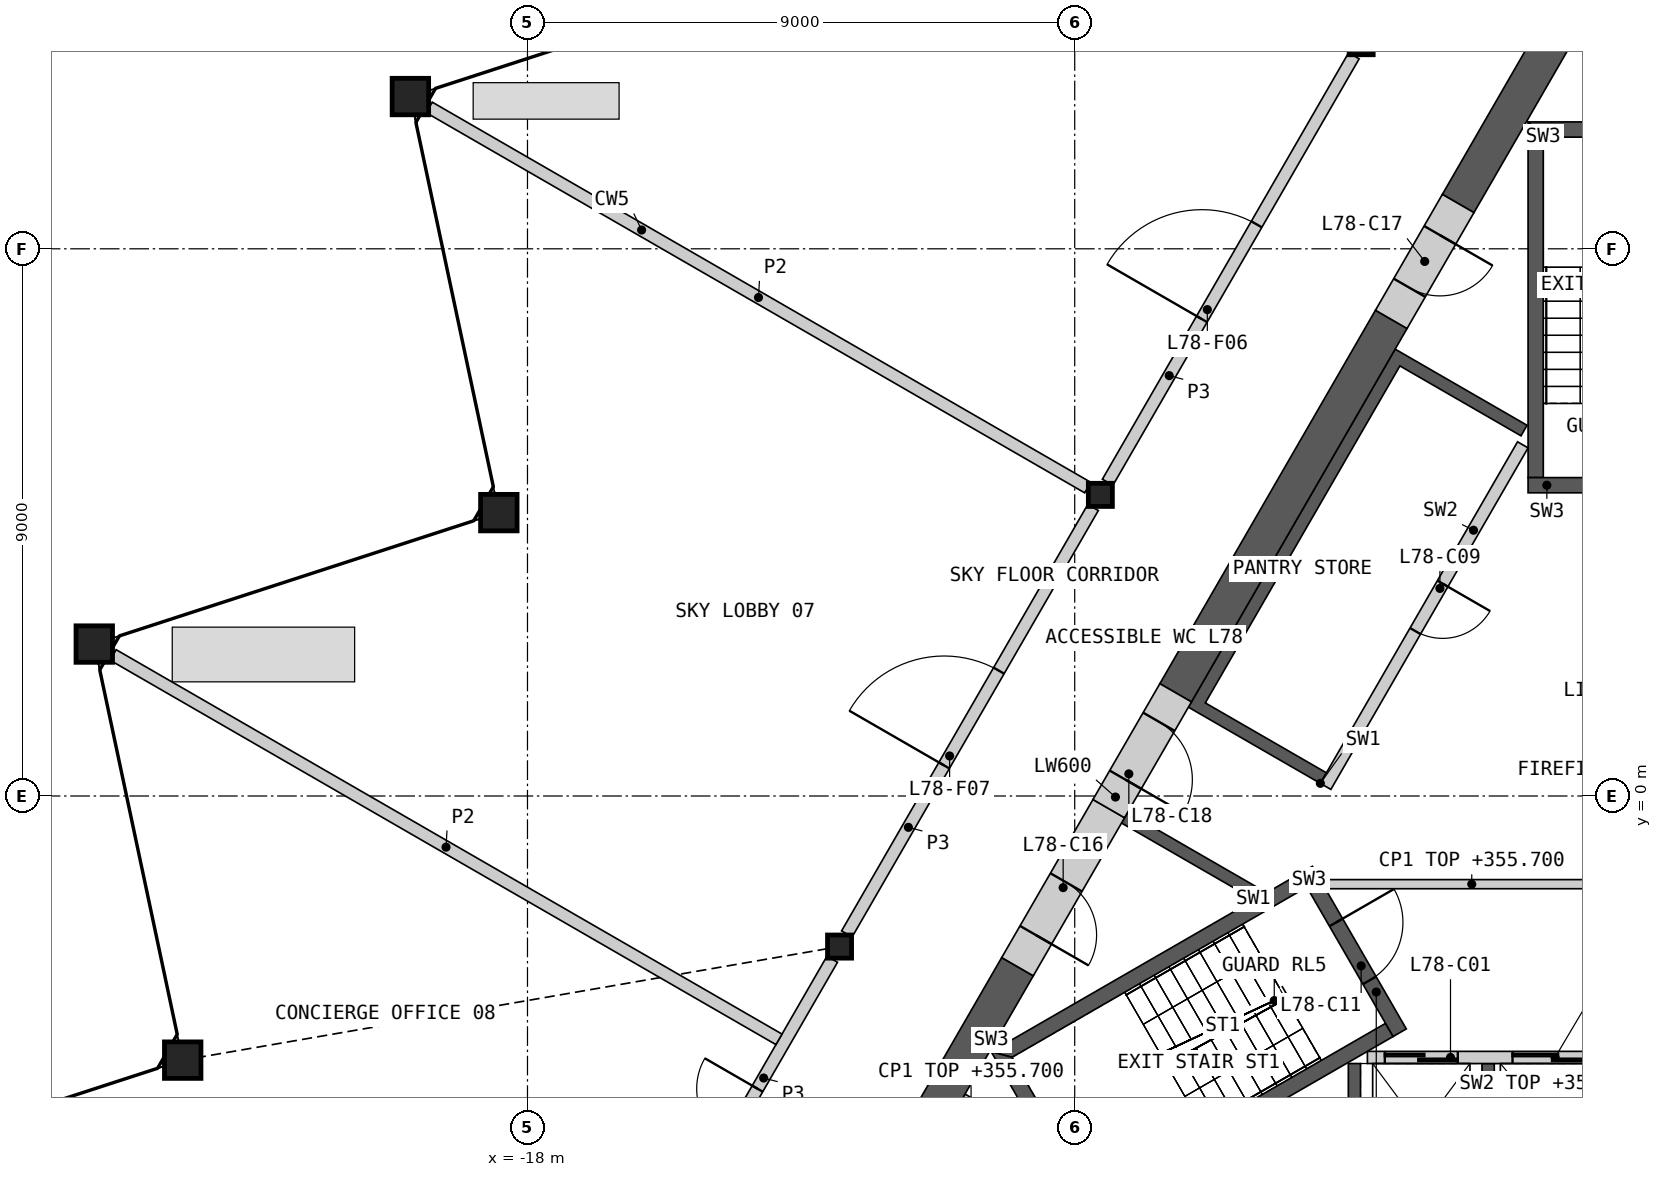
"""IFC4 building model, lengths in metres.
Left out: names, types, materials, properties, quantities, classifications, styles, units other than length and angle.
Written with IfcOpenShell. Run it as: python <this file> out.ifc"""

import sys

from ifc_helpers import new_model, si_unit, direction, frame, frame_2d, origin, origin_2d, place, context, subcontext, project, spatial, polyline, rectangle, hollow_rectangle, i_section, outline, extrude, element, fill, save


model = new_model("IFC4")
c1 = context("Model", 3, precision=1e-05, world=origin(), true_north=direction((0.0, 1.0)))
c2 = subcontext(c1, "Body", "Model", "MODEL_VIEW")
j1 = project(units=[si_unit("LENGTHUNIT", "METRE"), si_unit("PLANEANGLEUNIT", "RADIAN")], contexts=[c1])
p1 = place(None, origin())
s1 = spatial("IfcSite", under=j1, at=p1, CompositionType="ELEMENT")
p2 = place(p1, origin())
s2 = spatial("IfcBuilding", under=s1, at=p2, CompositionType="ELEMENT")
p3 = place(p2, frame((0.0, 0.0, 346.0)))
s3 = spatial("IfcBuildingStorey", under=s2, at=p3, CompositionType="ELEMENT", Elevation=346.0)
for number, where, z_axis, x_axis in (
    (1, (-19.926, 11.504, 0.0), (0.0, 0.0, 1.0), (1.0, 0.0, 0.0)),
    (2, (-18.471, 4.661, 0.0), (0.0, 0.0, 1.0), (1.0, 0.0, 0.0)),
    (3, (-25.125, 2.499, 0.0), (0.0, 0.0, 1.0), (1.0, 0.0, 0.0)),
    (4, (-23.67, -4.344, 0.0), (0.0, 0.0, 1.0), (1.0, 0.0, 0.0)),
):
    element("IfcColumn", number, at=place(p3, frame(where, z_axis=z_axis, x_axis=x_axis)), inside=s3, PredefinedType="COLUMN", context=c2, shape_type="SweptSolid", body=[
        extrude(hollow_rectangle(XDim=0.6, YDim=0.6, WallThickness=0.04, at=origin_2d()), origin(), (0.0, 0.0, 1.0), 10.0),
    ])
for number, where, z_axis, x_axis in (
    (5, (-4.289, 12.382, 0.0), (0.0, 0.0, 1.0), (1.0, 0.0, 0.0)),
    (6, (-8.578, 4.953, 0.0), (0.0, 0.0, 1.0), (1.0, 0.0, 0.0)),
    (7, (-12.868, -2.476, 0.0), (0.0, 0.0, 1.0), (1.0, 0.0, 0.0)),
):
    element("IfcColumn", number, at=place(p3, frame(where, z_axis=z_axis, x_axis=x_axis)), inside=s3, PredefinedType="COLUMN", context=c2, shape_type="SweptSolid", body=[
        extrude(i_section(OverallWidth=0.396, OverallDepth=0.381, WebThickness=0.019, FlangeThickness=0.03, at=origin_2d()), origin(), (0.0, 0.0, 1.0), 10.0),
    ])
p4 = place(p3, origin())
e8 = element("IfcWall", 8, at=p4, inside=s3, PredefinedType="SHEAR", context=c2, shape_type="SweptSolid", body=[
    extrude(outline(polyline([(4.5, -4.4), (4.5, -6.906), (-4.5, -6.906), (-4.5, -4.4), (-4.3, -4.4), (-4.3, -6.7), (-2.3, -6.7), (-2.3, -4.4), (-2.1, -4.4), (-2.1, -6.7), (-0.1, -6.7), (-0.1, -4.4), (0.1, -4.4), (0.1, -6.7), (2.1, -6.7), (2.1, -4.4), (2.3, -4.4), (2.3, -6.7), (4.3, -6.7), (4.3, -4.4), (4.5, -4.4)])), origin(), (0.0, 0.0, 1.0), 9.7),
])
p5 = place(p3, frame((-4.187, -4.3, 0.0), z_axis=(0.0, 0.0, 1.0), x_axis=(1.0, 0.0, 0.0)))
e9 = element("IfcWall", 9, at=p5, inside=s3, PredefinedType="SOLIDWALL", context=c2, shape_type="SweptSolid", body=[
    extrude(rectangle(XDim=8.373, YDim=0.2, at=frame_2d((4.187, 0.0))), origin(), (0.0, 0.0, 1.0), 9.7),
])
p6 = place(p5, frame((0.287, 0.0, 0.0)))
e10 = element("IfcOpeningElement", 10, at=p6, cuts=e9, PredefinedType="OPENING", context=c2, shape_type="SweptSolid", body=[
    extrude(rectangle(XDim=1.2, YDim=2.1, at=frame_2d((0.6, 1.05))), frame((0.0, 0.11, 0.0), z_axis=(0.0, -1.0, 0.0), x_axis=(1.0, 0.0, 0.0)), (0.0, 0.0, 1.0), 0.22),
])
p7 = place(p5, frame((2.387, 0.0, 0.0)))
e11 = element("IfcOpeningElement", 11, at=p7, cuts=e9, PredefinedType="OPENING", context=c2, shape_type="SweptSolid", body=[
    extrude(rectangle(XDim=1.4, YDim=2.1, at=frame_2d((0.7, 1.05))), frame((0.0, 0.11, 0.0), z_axis=(0.0, -1.0, 0.0), x_axis=(1.0, 0.0, 0.0)), (0.0, 0.0, 1.0), 0.22),
])
p8 = place(p5, frame((4.737, 0.0, 0.0)))
e12 = element("IfcOpeningElement", 12, at=p8, cuts=e9, PredefinedType="OPENING", context=c2, shape_type="SweptSolid", body=[
    extrude(rectangle(XDim=1.1, YDim=2.1, at=frame_2d((0.55, 1.05))), frame((0.0, 0.11, 0.0), z_axis=(0.0, -1.0, 0.0), x_axis=(1.0, 0.0, 0.0)), (0.0, 0.0, 1.0), 0.22),
])
p9 = place(p5, frame((6.887, 0.0, 0.0)))
e13 = element("IfcOpeningElement", 13, at=p9, cuts=e9, PredefinedType="OPENING", context=c2, shape_type="SweptSolid", body=[
    extrude(rectangle(XDim=1.2, YDim=2.1, at=frame_2d((0.6, 1.05))), frame((0.0, 0.11, 0.0), z_axis=(0.0, -1.0, 0.0), x_axis=(1.0, 0.0, 0.0)), (0.0, 0.0, 1.0), 0.22),
])
p10 = place(p3, origin())
e14 = element("IfcWall", 14, at=p10, inside=s3, PredefinedType="SHEAR", context=c2, shape_type="SweptSolid", body=[
    extrude(outline(polyline([(-6.061, -1.697), (-8.231, -0.444), (-8.131, -0.271), (-5.96, -1.524), (-6.061, -1.697)])), origin(), (0.0, 0.0, 1.0), 9.7),
])
p11 = place(p3, origin())
e15 = element("IfcWall", 15, at=p11, inside=s3, PredefinedType="SHEAR", context=c2, shape_type="SweptSolid", body=[
    extrude(outline(polyline([(-4.96, 0.208), (-7.131, 1.461), (-3.731, 7.35), (-1.561, 6.097), (-1.66, 5.924), (-3.652, 7.074), (-6.852, 1.531), (-4.861, 0.381), (-4.96, 0.208)])), origin(), (0.0, 0.0, 1.0), 9.7),
])
p12 = place(p3, frame((-1.631, 5.776, 0.0), z_axis=(0.0, 0.0, 1.0), x_axis=(-0.499992876559, -0.866029516466, 0.0)))
e16 = element("IfcWall", 16, at=p12, inside=s3, PredefinedType="SOLIDWALL", context=c2, shape_type="SweptSolid", body=[
    extrude(rectangle(XDim=6.486, YDim=0.2, at=frame_2d((3.243, 0.0))), origin(), (0.0, 0.0, 1.0), 9.7),
])
p13 = place(p12, frame((2.637, 0.0, 0.0)))
e17 = element("IfcOpeningElement", 17, at=p13, cuts=e16, PredefinedType="OPENING", context=c2, shape_type="SweptSolid", body=[
    extrude(rectangle(XDim=0.9, YDim=2.1, at=frame_2d((0.45, 1.05))), frame((0.0, 0.11, 0.0), z_axis=(0.0, -1.0, 0.0), x_axis=(1.0, 0.0, 0.0)), (0.0, 0.0, 1.0), 0.22),
])
p14 = place(p3, frame((-4.941, -1.45, 0.0), z_axis=(0.0, 0.0, 1.0), x_axis=(1.0, 0.0, 0.0)))
e18 = element("IfcWall", 18, at=p14, inside=s3, PredefinedType="PARTITIONING", context=c2, shape_type="SweptSolid", body=[
    extrude(rectangle(XDim=9.882, YDim=0.15, at=frame_2d((4.941, 0.0))), origin(), (0.0, 0.0, 1.0), 9.7),
])
p15 = place(p14, frame((4.391, 0.0, 0.0)))
e19 = element("IfcOpeningElement", 19, at=p15, cuts=e18, PredefinedType="OPENING", context=c2, shape_type="SweptSolid", body=[
    extrude(rectangle(XDim=1.1, YDim=2.1, at=frame_2d((0.55, 1.05))), frame((0.0, 0.085, 0.0), z_axis=(0.0, -1.0, 0.0), x_axis=(1.0, 0.0, 0.0)), (0.0, 0.0, 1.0), 0.17),
])
p16 = place(p3, origin())
e20 = element("IfcWall", 20, at=p16, inside=s3, PredefinedType="SHEAR", context=c2, shape_type="SweptSolid", body=[
    extrude(outline(polyline([(-5.307, -1.281), (-10.374, -4.206), (-10.032, -4.298), (-5.182, -1.498), (-5.307, -1.281)])), origin(), (0.0, 0.0, 1.0), 9.7),
])
p17 = place(p3, origin())
e21 = element("IfcWall", 21, at=p17, inside=s3, PredefinedType="SHEAR", context=c2, shape_type="SweptSolid", body=[
    extrude(outline(polyline([(-10.374, -4.206), (-8.83, -6.881), (-8.738, -6.539), (-10.032, -4.298), (-10.374, -4.206)])), origin(), (0.0, 0.0, 1.0), 9.7),
])
p18 = place(p3, origin())
e22 = element("IfcWall", 22, at=p18, inside=s3, PredefinedType="SHEAR", context=c2, shape_type="SweptSolid", body=[
    extrude(outline(polyline([(-8.738, -6.539), (-8.83, -6.881), (-3.763, -3.956), (-3.888, -3.739), (-8.738, -6.539)])), origin(), (0.0, 0.0, 1.0), 9.7),
])
p19 = place(p3, frame((-5.199, -1.219, 0.0), z_axis=(0.0, 0.0, 1.0), x_axis=(0.499982516597, -0.866035497597, 0.0)))
e23 = element("IfcWall", 23, at=p19, inside=s3, PredefinedType="SHEAR", context=c2, shape_type="SweptSolid", body=[
    extrude(rectangle(XDim=3.088, YDim=0.25, at=frame_2d((1.544, 0.0))), origin(), (0.0, 0.0, 1.0), 9.7),
])
p20 = place(p19, frame((0.994, 0.0, 0.0)))
e24 = element("IfcOpeningElement", 24, at=p20, cuts=e23, PredefinedType="OPENING", context=c2, shape_type="SweptSolid", body=[
    extrude(rectangle(XDim=1.1, YDim=2.1, at=frame_2d((0.55, 1.05))), frame((0.0, 0.135, 0.0), z_axis=(0.0, -1.0, 0.0), x_axis=(1.0, 0.0, 0.0)), (0.0, 0.0, 1.0), 0.27),
])
p21 = place(p3, origin())
e25 = element("IfcWall", 25, at=p21, inside=s3, PredefinedType="SHEAR", context=c2, shape_type="SweptSolid", body=[
    extrude(outline(polyline([(1.544, 11.087), (-1.544, 11.087), (-1.294, 10.837), (1.294, 10.837), (1.544, 11.087)])), origin(), (0.0, 0.0, 1.0), 9.7),
])
p22 = place(p3, origin())
e26 = element("IfcWall", 26, at=p22, inside=s3, PredefinedType="SHEAR", context=c2, shape_type="SweptSolid", body=[
    extrude(outline(polyline([(-1.294, 10.837), (-1.544, 11.087), (-1.544, 5.237), (-1.294, 5.237), (-1.294, 10.837)])), origin(), (0.0, 0.0, 1.0), 9.7),
])
p23 = place(p3, frame((1.544, 5.112, 0.0), z_axis=(0.0, 0.0, 1.0), x_axis=(-1.0, 0.0, 0.0)))
e27 = element("IfcWall", 27, at=p23, inside=s3, PredefinedType="SHEAR", context=c2, shape_type="SweptSolid", body=[
    extrude(rectangle(XDim=3.088, YDim=0.25, at=frame_2d((1.544, 0.0))), origin(), (0.0, 0.0, 1.0), 9.7),
])
p24 = place(p23, frame((0.994, 0.0, 0.0)))
e28 = element("IfcOpeningElement", 28, at=p24, cuts=e27, PredefinedType="OPENING", context=c2, shape_type="SweptSolid", body=[
    extrude(rectangle(XDim=1.1, YDim=2.1, at=frame_2d((0.55, 1.05))), frame((0.0, 0.135, 0.0), z_axis=(0.0, -1.0, 0.0), x_axis=(1.0, 0.0, 0.0)), (0.0, 0.0, 1.0), 0.27),
])
p25 = place(p3, frame((-10.842, -4.967, 0.0), z_axis=(0.0, 0.0, 1.0), x_axis=(0.866098216386, -0.499873863663, 0.0)))
e29 = element("IfcWall", 29, at=p25, inside=s3, PredefinedType="PARTITIONING", context=c2, shape_type="SweptSolid", body=[
    extrude(rectangle(XDim=1.582, YDim=0.15, at=frame_2d((0.791, 0.0))), origin(), (0.0, 0.0, 1.0), 9.7),
])
p26 = place(p3, frame((-3.794, 7.84, 0.0), z_axis=(0.0, 0.0, 1.0), x_axis=(-0.499974747889, -0.866039982607, 0.0)))
e30 = element("IfcWall", 30, at=p26, inside=s3, PredefinedType="SHEAR", context=c2, shape_type="SweptSolid", body=[
    extrude(rectangle(XDim=7.092, YDim=0.6, at=frame_2d((3.546, 0.0))), origin(), (0.0, 0.0, 1.0), 9.7),
])
p27 = place(p3, frame((-0.26, 13.961, 0.0), z_axis=(0.0, 0.0, 1.0), x_axis=(-0.50000604952, -0.866021911064, 0.0)))
e31 = element("IfcWall", 31, at=p27, inside=s3, PredefinedType="SHEAR", context=c2, shape_type="SweptSolid", body=[
    extrude(rectangle(XDim=4.869, YDim=0.6, at=frame_2d((2.434, 0.0))), origin(), (0.0, 0.0, 1.0), 9.7),
])
p28 = place(p3, frame((-9.941, -2.807, 0.0), z_axis=(0.0, 0.0, 1.0), x_axis=(-0.500020646047, -0.866013483456, 0.0)))
e32 = element("IfcWall", 32, at=p28, inside=s3, PredefinedType="SHEAR", context=c2, shape_type="SweptSolid", body=[
    extrude(rectangle(XDim=4.559, YDim=0.6, at=frame_2d((2.28, 0.0))), origin(), (0.0, 0.0, 1.0), 9.7),
])
p29 = place(p3, frame((-8.44, -0.208, 0.0), z_axis=(0.0, 0.0, 1.0), x_axis=(-0.499997052475, -0.866027105532, 0.0)))
e33 = element("IfcWall", 33, at=p29, inside=s3, PredefinedType="SHEAR", context=c2, shape_type="SweptSolid", body=[
    extrude(rectangle(XDim=3.001, YDim=0.6, at=frame_2d((1.501, 0.0))), origin(), (0.0, 0.0, 1.0), 9.7),
])
p30 = place(p29, frame((1.4, 0.0, 0.0)))
e34 = element("IfcOpeningElement", 34, at=p30, cuts=e33, PredefinedType="OPENING", context=c2, shape_type="SweptSolid", body=[
    extrude(rectangle(XDim=1.0, YDim=2.1, at=frame_2d((0.5, 1.05))), frame((0.0, 0.31, 0.0), z_axis=(0.0, -1.0, 0.0), x_axis=(1.0, 0.0, 0.0)), (0.0, 0.0, 1.0), 0.62),
])
p31 = place(p3, frame((-2.694, 9.745, 0.0), z_axis=(0.0, 0.0, 1.0), x_axis=(-0.50002983664, -0.866008176907, 0.0)))
e35 = element("IfcWall", 35, at=p31, inside=s3, PredefinedType="SHEAR", context=c2, shape_type="SweptSolid", body=[
    extrude(rectangle(XDim=2.2, YDim=0.6, at=frame_2d((1.1, 0.0))), origin(), (0.0, 0.0, 1.0), 9.7),
])
p32 = place(p31, frame((0.6, 0.0, 0.0)))
e36 = element("IfcOpeningElement", 36, at=p32, cuts=e35, PredefinedType="OPENING", context=c2, shape_type="SweptSolid", body=[
    extrude(rectangle(XDim=1.0, YDim=2.1, at=frame_2d((0.5, 1.05))), frame((0.0, 0.31, 0.0), z_axis=(0.0, -1.0, 0.0), x_axis=(1.0, 0.0, 0.0)), (0.0, 0.0, 1.0), 0.62),
])
p33 = place(p3, frame((-7.34, 1.698, 0.0), z_axis=(0.0, 0.0, 1.0), x_axis=(-0.50002983664, -0.866008176907, 0.0)))
e37 = element("IfcWall", 37, at=p33, inside=s3, PredefinedType="SHEAR", context=c2, shape_type="SweptSolid", body=[
    extrude(rectangle(XDim=2.2, YDim=0.6, at=frame_2d((1.1, 0.0))), origin(), (0.0, 0.0, 1.0), 9.7),
])
p34 = place(p33, frame((0.55, 0.0, 0.0)))
e38 = element("IfcOpeningElement", 38, at=p34, cuts=e37, PredefinedType="OPENING", context=c2, shape_type="SweptSolid", body=[
    extrude(rectangle(XDim=1.1, YDim=2.1, at=frame_2d((0.55, 1.05))), frame((0.0, 0.31, 0.0), z_axis=(0.0, -1.0, 0.0), x_axis=(1.0, 0.0, 0.0)), (0.0, 0.0, 1.0), 0.62),
])
p35 = place(p3, frame((-8.458, 5.16, 0.0), z_axis=(0.0, 0.0, 1.0), x_axis=(0.499984266882, 0.866034487114, 0.0)))
e39 = element("IfcWall", 39, at=p35, inside=s3, PredefinedType="PARTITIONING", context=c2, shape_type="SweptSolid", body=[
    extrude(rectangle(XDim=8.099, YDim=0.2, at=frame_2d((4.049, 0.0))), origin(), (0.0, 0.0, 1.0), 9.7),
])
p36 = place(p35, frame((3.099, 0.0, 0.0)))
e40 = element("IfcOpeningElement", 40, at=p36, cuts=e39, PredefinedType="OPENING", context=c2, shape_type="SweptSolid", body=[
    extrude(rectangle(XDim=1.8, YDim=2.1, at=frame_2d((0.9, 1.05))), frame((0.0, 0.11, 0.0), z_axis=(0.0, -1.0, 0.0), x_axis=(1.0, 0.0, 0.0)), (0.0, 0.0, 1.0), 0.22),
])
p37 = place(p3, frame((-12.748, -2.269, 0.0), z_axis=(0.0, 0.0, 1.0), x_axis=(0.499984266882, 0.866034487114, 0.0)))
e41 = element("IfcWall", 41, at=p37, inside=s3, PredefinedType="PARTITIONING", context=c2, shape_type="SweptSolid", body=[
    extrude(rectangle(XDim=8.099, YDim=0.2, at=frame_2d((4.049, 0.0))), origin(), (0.0, 0.0, 1.0), 9.7),
])
p38 = place(p37, frame((3.2, 0.0, 0.0)))
e42 = element("IfcOpeningElement", 42, at=p38, cuts=e41, PredefinedType="OPENING", context=c2, shape_type="SweptSolid", body=[
    extrude(rectangle(XDim=1.8, YDim=2.1, at=frame_2d((0.9, 1.05))), frame((0.0, 0.11, 0.0), z_axis=(0.0, -1.0, 0.0), x_axis=(1.0, 0.0, 0.0)), (0.0, 0.0, 1.0), 0.22),
])
p39 = place(p3, frame((-15.244, -6.592, 0.0), z_axis=(0.0, 0.0, 1.0), x_axis=(0.49999094734, 0.866030630277, 0.0)))
e43 = element("IfcWall", 43, at=p39, inside=s3, PredefinedType="PARTITIONING", context=c2, shape_type="SweptSolid", body=[
    extrude(rectangle(XDim=4.513, YDim=0.2, at=frame_2d((2.256, 0.0))), origin(), (0.0, 0.0, 1.0), 9.7),
])
p40 = place(p39, frame((1.053, 0.0, 0.0)))
e44 = element("IfcOpeningElement", 44, at=p40, cuts=e43, PredefinedType="OPENING", context=c2, shape_type="SweptSolid", body=[
    extrude(rectangle(XDim=1.0, YDim=2.1, at=frame_2d((0.5, 1.05))), frame((0.0, 0.11, 0.0), z_axis=(0.0, -1.0, 0.0), x_axis=(1.0, 0.0, 0.0)), (0.0, 0.0, 1.0), 0.22),
])
p41 = place(p3, frame((-24.815, 2.32, 0.0), z_axis=(0.0, 0.0, 1.0), x_axis=(0.866029324615, -0.499993208861, 0.0)))
e45 = element("IfcWall", 45, at=p41, inside=s3, PredefinedType="PARTITIONING", context=c2, shape_type="SweptSolid", body=[
    extrude(rectangle(XDim=12.645, YDim=0.2, at=frame_2d((6.322, 0.0))), origin(), (0.0, 0.0, 1.0), 8.93),
])
p42 = place(p3, frame((-19.615, 11.325, 0.0), z_axis=(0.0, 0.0, 1.0), x_axis=(0.86602139559, -0.500006942333, 0.0)))
e46 = element("IfcWall", 46, at=p42, inside=s3, PredefinedType="PARTITIONING", context=c2, shape_type="SweptSolid", body=[
    extrude(rectangle(XDim=12.505, YDim=0.2, at=frame_2d((6.252, 0.0))), origin(), (0.0, 0.0, 1.0), 8.93),
])
p43 = place(p6, origin())
e47 = element("IfcDoor", 47, at=p43, inside=s3, OperationType="SLIDING_TO_LEFT", PredefinedType="DOOR", context=c2, shape_type="SweptSolid", body=[
    extrude(rectangle(XDim=1.2, YDim=2.1, at=frame_2d((0.6, 1.05))), frame((0.0, 0.025, 0.0), z_axis=(0.0, -1.0, 0.0), x_axis=(1.0, 0.0, 0.0)), (0.0, 0.0, 1.0), 0.05),
])
fill(e10, e47)
p44 = place(p7, origin())
e48 = element("IfcDoor", 48, at=p44, inside=s3, OperationType="SLIDING_TO_LEFT", PredefinedType="DOOR", context=c2, shape_type="SweptSolid", body=[
    extrude(rectangle(XDim=1.4, YDim=2.1, at=frame_2d((0.7, 1.05))), frame((0.0, 0.025, 0.0), z_axis=(0.0, -1.0, 0.0), x_axis=(1.0, 0.0, 0.0)), (0.0, 0.0, 1.0), 0.05),
])
fill(e11, e48)
p45 = place(p13, origin())
e49 = element("IfcDoor", 49, at=p45, inside=s3, OperationType="SINGLE_SWING_LEFT", PredefinedType="DOOR", context=c2, shape_type="SweptSolid", body=[
    extrude(rectangle(XDim=0.9, YDim=2.1, at=frame_2d((0.45, 1.05))), frame((0.0, 0.025, 0.0), z_axis=(0.0, -1.0, 0.0), x_axis=(1.0, 0.0, 0.0)), (0.0, 0.0, 1.0), 0.05),
])
fill(e17, e49)
p46 = place(p20, origin())
e50 = element("IfcDoor", 50, at=p46, inside=s3, OperationType="SINGLE_SWING_LEFT", PredefinedType="DOOR", context=c2, shape_type="SweptSolid", body=[
    extrude(rectangle(XDim=1.1, YDim=2.1, at=frame_2d((0.55, 1.05))), frame((0.0, 0.025, 0.0), z_axis=(0.0, -1.0, 0.0), x_axis=(1.0, 0.0, 0.0)), (0.0, 0.0, 1.0), 0.05),
])
fill(e24, e50)
p47 = place(p30, origin())
e51 = element("IfcDoor", 51, at=p47, inside=s3, OperationType="SINGLE_SWING_RIGHT", PredefinedType="DOOR", context=c2, shape_type="SweptSolid", body=[
    extrude(rectangle(XDim=1.0, YDim=2.1, at=frame_2d((0.5, 1.05))), frame((0.0, 0.055, 0.0), z_axis=(0.0, -1.0, 0.0), x_axis=(1.0, 0.0, 0.0)), (0.0, 0.0, 1.0), 0.05),
])
fill(e34, e51)
p48 = place(p32, origin())
e52 = element("IfcDoor", 52, at=p48, inside=s3, OperationType="SINGLE_SWING_LEFT", PredefinedType="DOOR", context=c2, shape_type="SweptSolid", body=[
    extrude(rectangle(XDim=1.0, YDim=2.1, at=frame_2d((0.5, 1.05))), frame((0.0, 0.055, 0.0), z_axis=(0.0, -1.0, 0.0), x_axis=(1.0, 0.0, 0.0)), (0.0, 0.0, 1.0), 0.05),
])
fill(e36, e52)
p49 = place(p34, origin())
e53 = element("IfcDoor", 53, at=p49, inside=s3, OperationType="SINGLE_SWING_RIGHT", PredefinedType="DOOR", context=c2, shape_type="SweptSolid", body=[
    extrude(rectangle(XDim=1.1, YDim=2.1, at=frame_2d((0.55, 1.05))), frame((0.0, 0.055, 0.0), z_axis=(0.0, -1.0, 0.0), x_axis=(1.0, 0.0, 0.0)), (0.0, 0.0, 1.0), 0.05),
])
fill(e38, e53)
p50 = place(p36, origin())
e54 = element("IfcDoor", 54, at=p50, inside=s3, OperationType="DOUBLE_DOOR_SINGLE_SWING", PredefinedType="DOOR", context=c2, shape_type="SweptSolid", body=[
    extrude(rectangle(XDim=1.8, YDim=2.1, at=frame_2d((0.9, 1.05))), frame((0.0, 0.025, 0.0), z_axis=(0.0, -1.0, 0.0), x_axis=(1.0, 0.0, 0.0)), (0.0, 0.0, 1.0), 0.05),
])
fill(e40, e54)
p51 = place(p38, origin())
e55 = element("IfcDoor", 55, at=p51, inside=s3, OperationType="DOUBLE_DOOR_SINGLE_SWING", PredefinedType="DOOR", context=c2, shape_type="SweptSolid", body=[
    extrude(rectangle(XDim=1.8, YDim=2.1, at=frame_2d((0.9, 1.05))), frame((0.0, 0.025, 0.0), z_axis=(0.0, -1.0, 0.0), x_axis=(1.0, 0.0, 0.0)), (0.0, 0.0, 1.0), 0.05),
])
fill(e42, e55)
p52 = place(p40, origin())
e56 = element("IfcDoor", 56, at=p52, inside=s3, OperationType="SINGLE_SWING_RIGHT", PredefinedType="DOOR", context=c2, shape_type="SweptSolid", body=[
    extrude(rectangle(XDim=1.0, YDim=2.1, at=frame_2d((0.5, 1.05))), frame((0.0, 0.025, 0.0), z_axis=(0.0, -1.0, 0.0), x_axis=(1.0, 0.0, 0.0)), (0.0, 0.0, 1.0), 0.05),
])
fill(e44, e56)
save(model, sys.argv[1])
